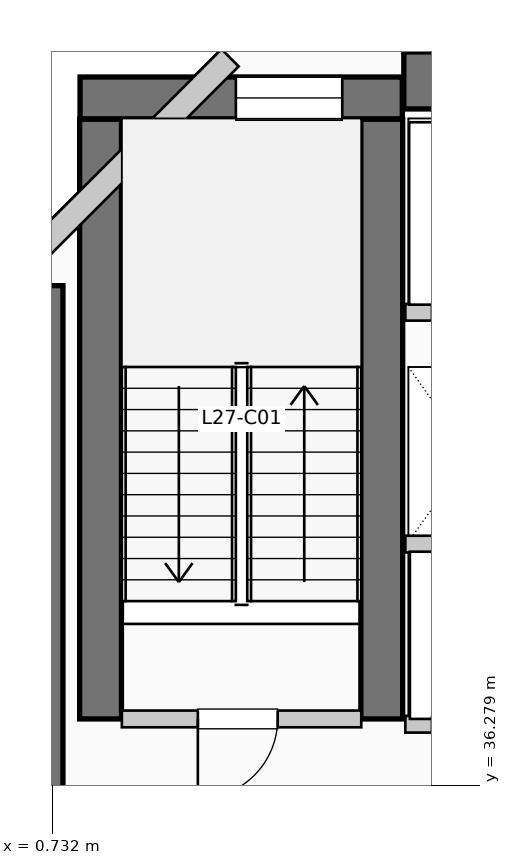
"""IFC4 building model, lengths in metres.
Left out: names, types, materials, properties, quantities, classifications, styles, units other than length and angle.
Written with IfcOpenShell. Run it as: python <this file> out.ifc"""

import sys

from ifc_helpers import new_model, si_unit, direction, frame, frame_2d, origin, place, context, subcontext, project, spatial, rectangle, extrude, element, fill, save


model = new_model("IFC4")
c1 = context("Model", 3, precision=1e-05, world=origin(), true_north=direction((0.0, 1.0)))
c2 = subcontext(c1, "Body", "Model", "MODEL_VIEW")
j1 = project(units=[si_unit("LENGTHUNIT", "METRE"), si_unit("PLANEANGLEUNIT", "RADIAN")], contexts=[c1])
p1 = place(None, origin())
s1 = spatial("IfcSite", under=j1, at=p1, CompositionType="ELEMENT")
p2 = place(p1, origin())
s2 = spatial("IfcBuilding", under=s1, at=p2, CompositionType="ELEMENT")
p3 = place(p2, frame((0.0, 0.0, 114.51)))
s3 = spatial("IfcBuildingStorey", under=s2, at=p3, CompositionType="ELEMENT", Elevation=114.51)
p4 = place(p3, frame((5.36, 45.55, 0.0), z_axis=(0.0, 0.0, 1.0), x_axis=(1.0, 0.0, 0.0)))
e1 = element("IfcWall", 1, at=p4, inside=s3, PredefinedType="SHEAR", context=c2, shape_type="SweptSolid", body=[
    extrude(rectangle(XDim=13.98, YDim=0.75, at=frame_2d((6.99, 0.0))), origin(), (0.0, 0.0, 1.0), 3.96),
])
p5 = place(p3, frame((0.5, 34.95, 0.0), z_axis=(0.0, 0.0, 1.0), x_axis=(0.0, 1.0, 0.0)))
e2 = element("IfcWall", 2, at=p5, inside=s3, PredefinedType="SHEAR", context=c2, shape_type="SweptSolid", body=[
    extrude(rectangle(XDim=7.9, YDim=0.75, at=frame_2d((3.95, 0.0))), origin(), (0.0, 0.0, 1.0), 3.96),
])
for number, where, z_axis, x_axis in (
    (3, (1.37, 37.15, 0.0), (0.0, 0.0, 1.0), (0.0, 1.0, 0.0)),
    (4, (5.07, 37.15, 0.0), (0.0, 0.0, 1.0), (0.0, 1.0, 0.0)),
):
    element("IfcWall", number, at=place(p3, frame(where, z_axis=z_axis, x_axis=x_axis)), inside=s3, PredefinedType="SHEAR", context=c2, shape_type="SweptSolid", body=[
        extrude(rectangle(XDim=7.89, YDim=0.55, at=frame_2d((3.945, 0.0))), origin(), (0.0, 0.0, 1.0), 3.96),
    ])
p6 = place(p3, frame((1.1, 45.32, 0.0), z_axis=(0.0, 0.0, 1.0), x_axis=(1.0, 0.0, 0.0)))
e5 = element("IfcWall", 5, at=p6, inside=s3, PredefinedType="SHEAR", context=c2, shape_type="SweptSolid", body=[
    extrude(rectangle(XDim=4.24, YDim=0.55, at=frame_2d((2.12, 0.0))), origin(), (0.0, 0.0, 1.0), 3.96),
])
p7 = place(p6, frame((2.05, 0.0, 1.05)))
e6 = element("IfcOpeningElement", 6, at=p7, cuts=e5, PredefinedType="OPENING", context=c2, shape_type="SweptSolid", body=[
    extrude(rectangle(XDim=1.4, YDim=1.8, at=frame_2d((0.7, 0.9))), frame((0.0, 0.285, 0.0), z_axis=(0.0, -1.0, 0.0), x_axis=(1.0, 0.0, 0.0)), (0.0, 0.0, 1.0), 0.57),
])
p8 = place(p3, frame((3.074, 45.848, 0.0), z_axis=(0.0, 0.0, 1.0), x_axis=(-0.707106781187, -0.707106781187, 0.0)))
e7 = element("IfcWall", 7, at=p8, inside=s3, PredefinedType="SOLIDWALL", context=c2, shape_type="SweptSolid", body=[
    extrude(rectangle(XDim=4.133, YDim=0.32, at=frame_2d((2.066, 0.0))), origin(), (0.0, 0.0, 1.0), 3.71),
])
p9 = place(p3, frame((1.65, 37.15, 0.0), z_axis=(0.0, 0.0, 1.0), x_axis=(1.0, 0.0, 0.0)))
e8 = element("IfcWall", 8, at=p9, inside=s3, PredefinedType="PARTITIONING", context=c2, shape_type="SweptSolid", body=[
    extrude(rectangle(XDim=3.15, YDim=0.22, at=frame_2d((1.575, 0.0))), origin(), (0.0, 0.0, 1.0), 3.71),
])
p10 = place(p9, frame((2.05, 0.0, 0.0), z_axis=(0.0, 0.0, 1.0), x_axis=(-1.0, 0.0, 0.0)))
e9 = element("IfcOpeningElement", 9, at=p10, cuts=e8, PredefinedType="OPENING", context=c2, shape_type="SweptSolid", body=[
    extrude(rectangle(XDim=1.05, YDim=2.15, at=frame_2d((0.525, 1.075))), frame((0.0, 0.12, 0.0), z_axis=(0.0, -1.0, 0.0), x_axis=(1.0, 0.0, 0.0)), (0.0, 0.0, 1.0), 0.24),
])
p11 = place(p3, frame((5.38, 37.08, 0.0), z_axis=(0.0, 0.0, 1.0), x_axis=(1.0, 0.0, 0.0)))
e10 = element("IfcWall", 10, at=p11, inside=s3, PredefinedType="PARTITIONING", context=c2, shape_type="SweptSolid", body=[
    extrude(rectangle(XDim=3.46, YDim=0.22, at=frame_2d((1.73, 0.0))), origin(), (0.0, 0.0, 1.0), 3.71),
])
p12 = place(p11, frame((1.55, 0.0, 0.0), z_axis=(0.0, 0.0, 1.0), x_axis=(-1.0, 0.0, 0.0)))
e11 = element("IfcOpeningElement", 11, at=p12, cuts=e10, PredefinedType="OPENING", context=c2, shape_type="SweptSolid", body=[
    extrude(rectangle(XDim=1.2, YDim=2.2, at=frame_2d((0.6, 1.1))), frame((0.0, 0.12, 0.0), z_axis=(0.0, -1.0, 0.0), x_axis=(1.0, 0.0, 0.0)), (0.0, 0.0, 1.0), 0.24),
])
p13 = place(p11, frame((3.22, 0.0, 0.0), z_axis=(0.0, 0.0, 1.0), x_axis=(-1.0, 0.0, 0.0)))
e12 = element("IfcOpeningElement", 12, at=p13, cuts=e10, PredefinedType="OPENING", context=c2, shape_type="SweptSolid", body=[
    extrude(rectangle(XDim=1.2, YDim=2.2, at=frame_2d((0.6, 1.1))), frame((0.0, 0.12, 0.0), z_axis=(0.0, -1.0, 0.0), x_axis=(1.0, 0.0, 0.0)), (0.0, 0.0, 1.0), 0.24),
])
p14 = place(p3, frame((5.38, 39.45, 0.0), z_axis=(0.0, 0.0, 1.0), x_axis=(1.0, 0.0, 0.0)))
e13 = element("IfcWall", 13, at=p14, inside=s3, PredefinedType="PARTITIONING", context=c2, shape_type="SweptSolid", body=[
    extrude(rectangle(XDim=3.46, YDim=0.22, at=frame_2d((1.73, 0.0))), origin(), (0.0, 0.0, 1.0), 3.71),
])
p15 = place(p3, frame((5.38, 42.5, 0.0), z_axis=(0.0, 0.0, 1.0), x_axis=(1.0, 0.0, 0.0)))
e14 = element("IfcWall", 14, at=p15, inside=s3, PredefinedType="PARTITIONING", context=c2, shape_type="SweptSolid", body=[
    extrude(rectangle(XDim=3.77, YDim=0.22, at=frame_2d((1.885, 0.0))), origin(), (0.0, 0.0, 1.0), 3.71),
])
p16 = place(p15, frame((1.75, 0.0, 0.0), z_axis=(0.0, 0.0, 1.0), x_axis=(-1.0, 0.0, 0.0)))
e15 = element("IfcOpeningElement", 15, at=p16, cuts=e14, PredefinedType="OPENING", context=c2, shape_type="SweptSolid", body=[
    extrude(rectangle(XDim=1.4, YDim=2.2, at=frame_2d((0.7, 1.1))), frame((0.0, 0.12, 0.0), z_axis=(0.0, -1.0, 0.0), x_axis=(1.0, 0.0, 0.0)), (0.0, 0.0, 1.0), 0.24),
])
p17 = place(p15, frame((3.53, 0.0, 0.0), z_axis=(0.0, 0.0, 1.0), x_axis=(-1.0, 0.0, 0.0)))
e16 = element("IfcOpeningElement", 16, at=p17, cuts=e14, PredefinedType="OPENING", context=c2, shape_type="SweptSolid", body=[
    extrude(rectangle(XDim=1.4, YDim=2.2, at=frame_2d((0.7, 1.1))), frame((0.0, 0.12, 0.0), z_axis=(0.0, -1.0, 0.0), x_axis=(1.0, 0.0, 0.0)), (0.0, 0.0, 1.0), 0.24),
])
p18 = place(p7, origin())
e17 = element("IfcWindow", 17, at=p18, inside=s3, PartitioningType="SINGLE_PANEL", PredefinedType="WINDOW", context=c2, shape_type="SweptSolid", body=[
    extrude(rectangle(XDim=1.4, YDim=1.8, at=frame_2d((0.7, 0.9))), frame((0.0, 0.03, 0.0), z_axis=(0.0, -1.0, 0.0), x_axis=(1.0, 0.0, 0.0)), (0.0, 0.0, 1.0), 0.06),
])
fill(e6, e17)
p19 = place(p10, origin())
e18 = element("IfcDoor", 18, at=p19, inside=s3, OperationType="SINGLE_SWING_LEFT", PredefinedType="DOOR", context=c2, shape_type="SweptSolid", body=[
    extrude(rectangle(XDim=1.05, YDim=2.15, at=frame_2d((0.525, 1.075))), frame((0.0, 0.025, 0.0), z_axis=(0.0, -1.0, 0.0), x_axis=(1.0, 0.0, 0.0)), (0.0, 0.0, 1.0), 0.05),
])
fill(e9, e18)
save(model, sys.argv[1])
